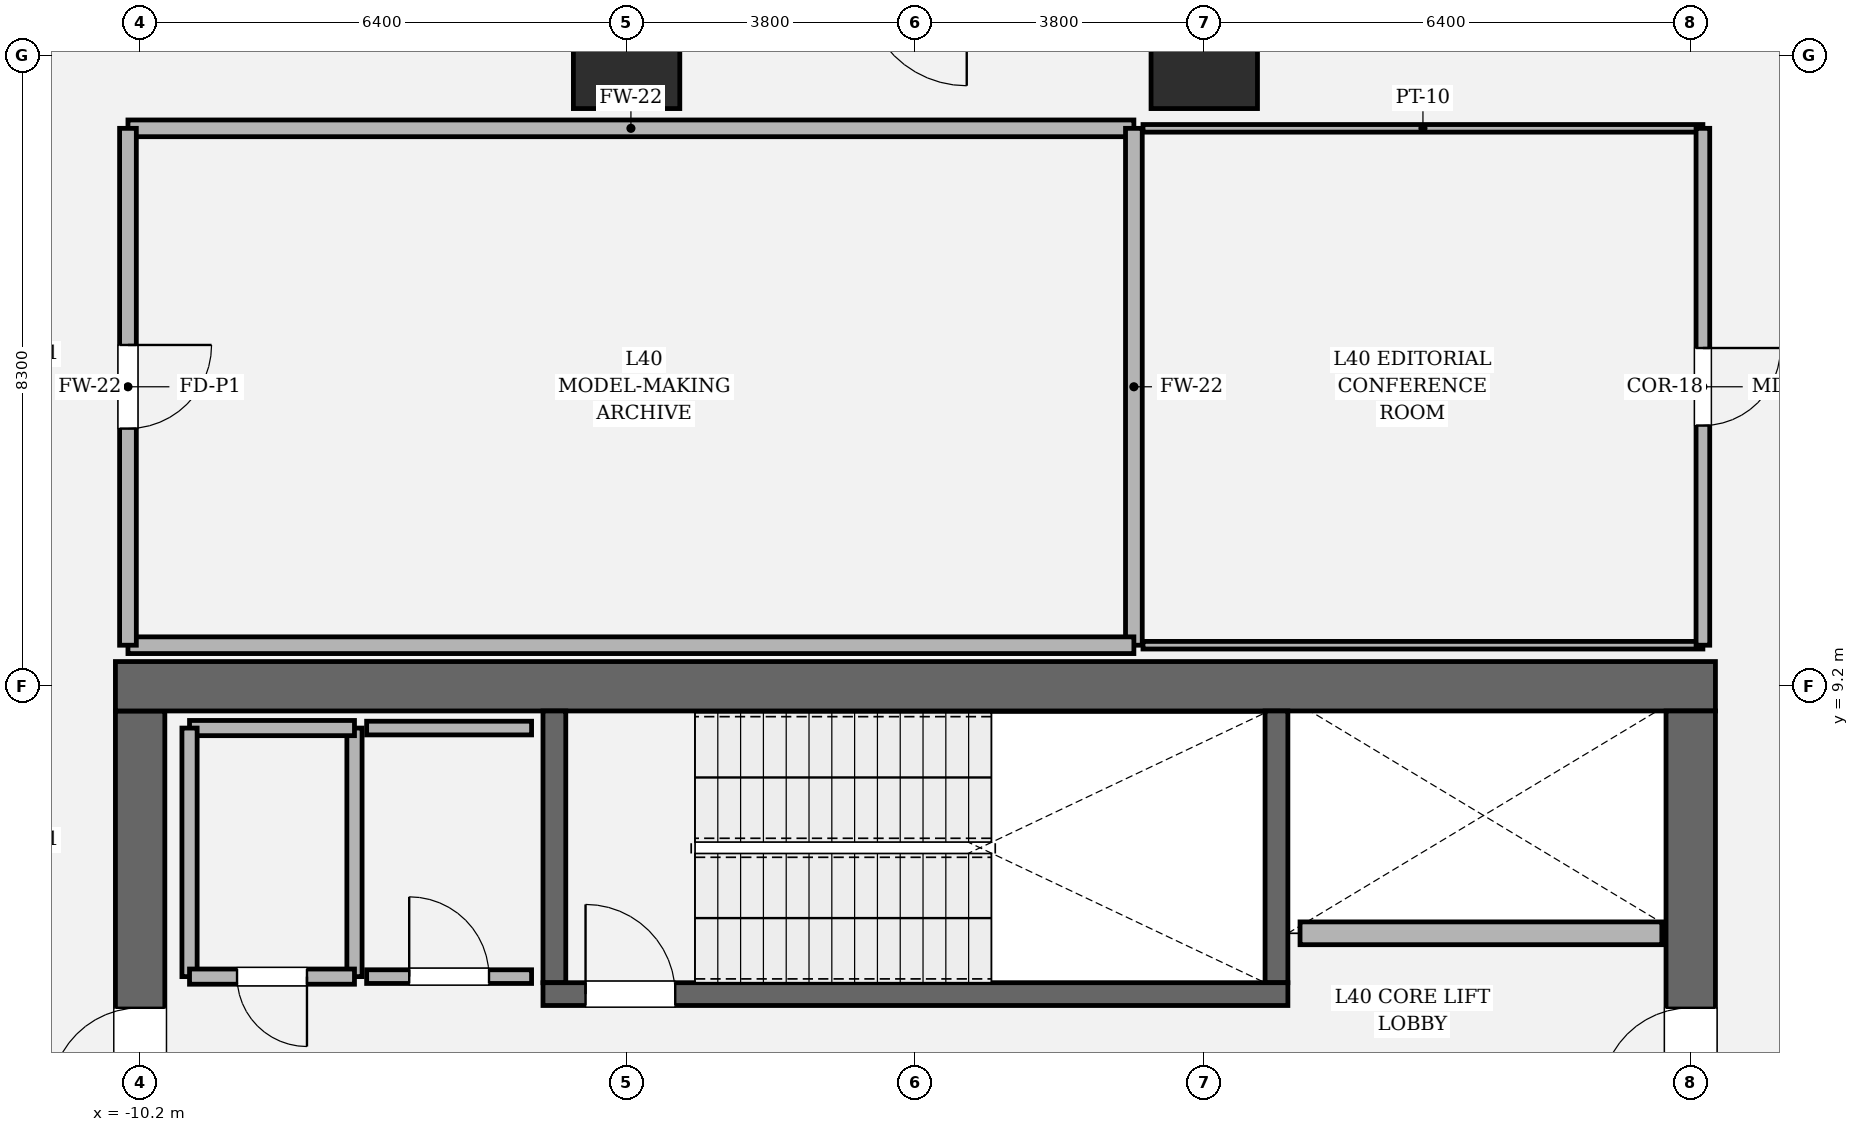
"""IFC4 building model, lengths in metres.
Left out: names, types, materials, properties, quantities, classifications, styles, units other than length and angle.
Written with IfcOpenShell. Run it as: python <this file> out.ifc"""

import sys

from ifc_helpers import new_model, si_unit, direction, frame, frame_2d, origin, origin_2d, place, context, subcontext, project, spatial, rectangle, hollow_rectangle, extrude, element, fill, save


model = new_model("IFC4")
c1 = context("Model", 3, precision=1e-05, world=origin(), true_north=direction((0.0, 1.0)))
c2 = subcontext(c1, "Body", "Model", "MODEL_VIEW")
j1 = project(units=[si_unit("LENGTHUNIT", "METRE"), si_unit("PLANEANGLEUNIT", "RADIAN")], contexts=[c1])
p1 = place(None, origin())
s1 = spatial("IfcSite", under=j1, at=p1, CompositionType="ELEMENT")
p2 = place(p1, origin())
s2 = spatial("IfcBuilding", under=s1, at=p2, CompositionType="ELEMENT")
p3 = place(p2, frame((0.0, 0.0, 172.2)))
s3 = spatial("IfcBuildingStorey", under=s2, at=p3, CompositionType="ELEMENT", Elevation=172.2)
p4 = place(p3, frame((-10.2, -8.875, 0.0), z_axis=(0.0, 0.0, 1.0), x_axis=(0.0, 1.0, 0.0)))
e1 = element("IfcWall", 1, at=p4, inside=s3, PredefinedType="SHEAR", context=c2, shape_type="SweptSolid", body=[
    extrude(rectangle(XDim=17.75, YDim=0.65, at=frame_2d((8.875, 0.0))), origin(), (0.0, 0.0, 1.0), 4.05),
])
p5 = place(p4, frame((12.665, 0.0, 0.0)))
e2 = element("IfcOpeningElement", 2, at=p5, cuts=e1, PredefinedType="OPENING", context=c2, shape_type="SweptSolid", body=[
    extrude(rectangle(XDim=1.18, YDim=2.2, at=frame_2d((0.59, 1.1))), frame((0.0, 0.335, 0.0), z_axis=(0.0, -1.0, 0.0), x_axis=(1.0, 0.0, 0.0)), (0.0, 0.0, 1.0), 0.67),
])
p6 = place(p3, frame((-10.525, 9.2, 0.0), z_axis=(0.0, 0.0, 1.0), x_axis=(1.0, 0.0, 0.0)))
e3 = element("IfcWall", 3, at=p6, inside=s3, PredefinedType="SHEAR", context=c2, shape_type="SweptSolid", body=[
    extrude(rectangle(XDim=21.05, YDim=0.65, at=frame_2d((10.525, 0.0))), origin(), (0.0, 0.0, 1.0), 4.05),
])
p7 = place(p3, frame((10.2, 8.875, 0.0), z_axis=(0.0, 0.0, 1.0), x_axis=(0.0, -1.0, 0.0)))
e4 = element("IfcWall", 4, at=p7, inside=s3, PredefinedType="SHEAR", context=c2, shape_type="SweptSolid", body=[
    extrude(rectangle(XDim=17.75, YDim=0.65, at=frame_2d((8.875, 0.0))), origin(), (0.0, 0.0, 1.0), 4.05),
])
p8 = place(p7, frame((3.905, 0.0, 0.0)))
e5 = element("IfcOpeningElement", 5, at=p8, cuts=e4, PredefinedType="OPENING", context=c2, shape_type="SweptSolid", body=[
    extrude(rectangle(XDim=1.18, YDim=2.2, at=frame_2d((0.59, 1.1))), frame((0.0, 0.335, 0.0), z_axis=(0.0, -1.0, 0.0), x_axis=(1.0, 0.0, 0.0)), (0.0, 0.0, 1.0), 0.67),
])
for number, where, z_axis, x_axis in (
    (6, (-4.75, 5.3, 0.0), (0.0, 0.0, 1.0), (0.0, 1.0, 0.0)),
    (7, (4.75, 8.875, 0.0), (0.0, 0.0, 1.0), (0.0, -1.0, 0.0)),
):
    element("IfcWall", number, at=place(p3, frame(where, z_axis=z_axis, x_axis=x_axis)), inside=s3, PredefinedType="SOLIDWALL", context=c2, shape_type="SweptSolid", body=[
        extrude(rectangle(XDim=3.575, YDim=0.3, at=frame_2d((1.788, 0.0))), origin(), (0.0, 0.0, 1.0), 4.05),
    ])
p9 = place(p3, frame((-4.9, 5.15, 0.0), z_axis=(0.0, 0.0, 1.0), x_axis=(1.0, 0.0, 0.0)))
e8 = element("IfcWall", 8, at=p9, inside=s3, PredefinedType="SOLIDWALL", context=c2, shape_type="SweptSolid", body=[
    extrude(rectangle(XDim=9.8, YDim=0.3, at=frame_2d((4.9, 0.0))), origin(), (0.0, 0.0, 1.0), 4.05),
])
p10 = place(p9, frame((0.56, 0.0, 0.0)))
e9 = element("IfcOpeningElement", 9, at=p10, cuts=e8, PredefinedType="OPENING", context=c2, shape_type="SweptSolid", body=[
    extrude(rectangle(XDim=1.18, YDim=2.2, at=frame_2d((0.59, 1.1))), frame((0.0, 0.16, 0.0), z_axis=(0.0, -1.0, 0.0), x_axis=(1.0, 0.0, 0.0)), (0.0, 0.0, 1.0), 0.32),
])
for number, where, z_axis, x_axis in (
    (10, (3.8, 17.5, 0.0), (0.0, 0.0, 1.0), (1.0, 0.0, 0.0)),
    (11, (-3.8, 17.5, 0.0), (0.0, 0.0, 1.0), (1.0, 0.0, 0.0)),
):
    element("IfcColumn", number, at=place(p3, frame(where, z_axis=z_axis, x_axis=x_axis)), inside=s3, PredefinedType="COLUMN", context=c2, shape_type="SweptSolid", body=[
        extrude(hollow_rectangle(XDim=1.4, YDim=1.4, WallThickness=0.042, at=origin_2d()), origin(), (0.0, 0.0, 1.0), 4.05),
    ])
p11 = place(p3, frame((5.06, 5.95, 0.0), z_axis=(0.0, 0.0, 1.0), x_axis=(1.0, 0.0, 0.0)))
e12 = element("IfcWall", 12, at=p11, inside=s3, PredefinedType="SOLIDWALL", context=c2, shape_type="SweptSolid", body=[
    extrude(rectangle(XDim=4.76, YDim=0.3, at=frame_2d((2.38, 0.0))), origin(), (0.0, 0.0, 1.0), 3.83),
])
p12 = place(p3, frame((-7.38, 5.38, 0.0), z_axis=(0.0, 0.0, 1.0), x_axis=(0.0, 1.0, 0.0)))
e13 = element("IfcWall", 13, at=p12, inside=s3, PredefinedType="SOLIDWALL", context=c2, shape_type="SweptSolid", body=[
    extrude(rectangle(XDim=3.27, YDim=0.2, at=frame_2d((1.635, 0.0))), origin(), (0.0, 0.0, 1.0), 3.83),
])
p13 = place(p3, frame((-7.38, 8.65, 0.0), z_axis=(0.0, 0.0, 1.0), x_axis=(-1.0, 0.0, 0.0)))
e14 = element("IfcWall", 14, at=p13, inside=s3, PredefinedType="SOLIDWALL", context=c2, shape_type="SweptSolid", body=[
    extrude(rectangle(XDim=2.17, YDim=0.2, at=frame_2d((1.085, 0.0))), origin(), (0.0, 0.0, 1.0), 3.83),
])
p14 = place(p3, frame((-9.55, 8.65, 0.0), z_axis=(0.0, 0.0, 1.0), x_axis=(0.0, -1.0, 0.0)))
e15 = element("IfcWall", 15, at=p14, inside=s3, PredefinedType="SOLIDWALL", context=c2, shape_type="SweptSolid", body=[
    extrude(rectangle(XDim=3.27, YDim=0.2, at=frame_2d((1.635, 0.0))), origin(), (0.0, 0.0, 1.0), 3.83),
])
p15 = place(p3, frame((-9.55, 5.38, 0.0), z_axis=(0.0, 0.0, 1.0), x_axis=(1.0, 0.0, 0.0)))
e16 = element("IfcWall", 16, at=p15, inside=s3, PredefinedType="SOLIDWALL", context=c2, shape_type="SweptSolid", body=[
    extrude(rectangle(XDim=2.17, YDim=0.2, at=frame_2d((1.085, 0.0))), origin(), (0.0, 0.0, 1.0), 3.83),
])
p16 = place(p15, frame((0.625, 0.0, 0.0)))
e17 = element("IfcOpeningElement", 17, at=p16, cuts=e16, PredefinedType="OPENING", context=c2, shape_type="SweptSolid", body=[
    extrude(rectangle(XDim=0.92, YDim=2.1, at=frame_2d((0.46, 1.05))), frame((0.0, 0.11, 0.0), z_axis=(0.0, -1.0, 0.0), x_axis=(1.0, 0.0, 0.0)), (0.0, 0.0, 1.0), 0.22),
])
p17 = place(p3, frame((-5.05, 8.65, 0.0), z_axis=(0.0, 0.0, 1.0), x_axis=(-1.0, 0.0, 0.0)))
e18 = element("IfcWall", 18, at=p17, inside=s3, PredefinedType="PARTITIONING", context=c2, shape_type="SweptSolid", body=[
    extrude(rectangle(XDim=2.17, YDim=0.18, at=frame_2d((1.085, 0.0))), origin(), (0.0, 0.0, 1.0), 3.83),
])
p18 = place(p3, frame((-7.22, 5.38, 0.0), z_axis=(0.0, 0.0, 1.0), x_axis=(1.0, 0.0, 0.0)))
e19 = element("IfcWall", 19, at=p18, inside=s3, PredefinedType="PARTITIONING", context=c2, shape_type="SweptSolid", body=[
    extrude(rectangle(XDim=2.17, YDim=0.18, at=frame_2d((1.085, 0.0))), origin(), (0.0, 0.0, 1.0), 3.83),
])
p19 = place(p18, frame((0.56, 0.0, 0.0)))
e20 = element("IfcOpeningElement", 20, at=p19, cuts=e19, PredefinedType="OPENING", context=c2, shape_type="SweptSolid", body=[
    extrude(rectangle(XDim=1.05, YDim=2.2, at=frame_2d((0.525, 1.1))), frame((0.0, 0.1, 0.0), z_axis=(0.0, -1.0, 0.0), x_axis=(1.0, 0.0, 0.0)), (0.0, 0.0, 1.0), 0.2),
])
p20 = place(p3, frame((-10.36, 16.54, 0.0), z_axis=(0.0, 0.0, 1.0), x_axis=(1.0, 0.0, 0.0)))
e21 = element("IfcWall", 21, at=p20, inside=s3, PredefinedType="SOLIDWALL", context=c2, shape_type="SweptSolid", body=[
    extrude(rectangle(XDim=13.234, YDim=0.22, at=frame_2d((6.617, 0.0))), origin(), (0.0, 0.0, 1.0), 3.174),
])
p21 = place(p3, frame((2.874, 16.54, 0.0), z_axis=(0.0, 0.0, 1.0), x_axis=(0.0, -1.0, 0.0)))
e22 = element("IfcWall", 22, at=p21, inside=s3, PredefinedType="SOLIDWALL", context=c2, shape_type="SweptSolid", body=[
    extrude(rectangle(XDim=6.8, YDim=0.22, at=frame_2d((3.4, 0.0))), origin(), (0.0, 0.0, 1.0), 3.83),
])
p22 = place(p3, frame((2.874, 9.74, 0.0), z_axis=(0.0, 0.0, 1.0), x_axis=(-1.0, 0.0, 0.0)))
e23 = element("IfcWall", 23, at=p22, inside=s3, PredefinedType="SOLIDWALL", context=c2, shape_type="SweptSolid", body=[
    extrude(rectangle(XDim=13.234, YDim=0.22, at=frame_2d((6.617, 0.0))), origin(), (0.0, 0.0, 1.0), 3.174),
])
p23 = place(p3, frame((-10.36, 9.74, 0.0), z_axis=(0.0, 0.0, 1.0), x_axis=(0.0, 1.0, 0.0)))
e24 = element("IfcWall", 24, at=p23, inside=s3, PredefinedType="SOLIDWALL", context=c2, shape_type="SweptSolid", body=[
    extrude(rectangle(XDim=6.8, YDim=0.22, at=frame_2d((3.4, 0.0))), origin(), (0.0, 0.0, 1.0), 3.174),
])
p24 = place(p23, frame((2.85, 0.0, 0.0)))
e25 = element("IfcOpeningElement", 25, at=p24, cuts=e24, PredefinedType="OPENING", context=c2, shape_type="SweptSolid", body=[
    extrude(rectangle(XDim=1.1, YDim=2.2, at=frame_2d((0.55, 1.1))), frame((0.0, 0.12, 0.0), z_axis=(0.0, -1.0, 0.0), x_axis=(1.0, 0.0, 0.0)), (0.0, 0.0, 1.0), 0.24),
])
for number, where, z_axis, x_axis in (
    (26, (10.36, 9.74, 0.0), (0.0, 0.0, 1.0), (-1.0, 0.0, 0.0)),
    (27, (2.994, 16.54, 0.0), (0.0, 0.0, 1.0), (1.0, 0.0, 0.0)),
):
    element("IfcWall", number, at=place(p3, frame(where, z_axis=z_axis, x_axis=x_axis)), inside=s3, PredefinedType="PARTITIONING", context=c2, shape_type="SweptSolid", body=[
        extrude(rectangle(XDim=7.366, YDim=0.1, at=frame_2d((3.683, 0.0))), origin(), (0.0, 0.0, 1.0), 3.174),
    ])
p25 = place(p3, frame((10.36, 16.54, 0.0), z_axis=(0.0, 0.0, 1.0), x_axis=(0.0, -1.0, 0.0)))
e28 = element("IfcWall", 28, at=p25, inside=s3, PredefinedType="PARTITIONING", context=c2, shape_type="SweptSolid", body=[
    extrude(rectangle(XDim=6.8, YDim=0.18, at=frame_2d((3.4, 0.0))), origin(), (0.0, 0.0, 1.0), 3.174),
])
p26 = place(p25, frame((2.89, 0.0, 0.0)))
e29 = element("IfcOpeningElement", 29, at=p26, cuts=e28, PredefinedType="OPENING", context=c2, shape_type="SweptSolid", body=[
    extrude(rectangle(XDim=1.02, YDim=2.2, at=frame_2d((0.51, 1.1))), frame((0.0, 0.1, 0.0), z_axis=(0.0, -1.0, 0.0), x_axis=(1.0, 0.0, 0.0)), (0.0, 0.0, 1.0), 0.2),
])
p27 = place(p10, origin())
e30 = element("IfcDoor", 30, at=p27, inside=s3, OperationType="SINGLE_SWING_LEFT", PredefinedType="DOOR", context=c2, shape_type="SweptSolid", body=[
    extrude(rectangle(XDim=1.18, YDim=2.2, at=frame_2d((0.59, 1.1))), frame((0.0, 0.025, 0.0), z_axis=(0.0, -1.0, 0.0), x_axis=(1.0, 0.0, 0.0)), (0.0, 0.0, 1.0), 0.05),
])
fill(e9, e30)
p28 = place(p5, origin())
e31 = element("IfcDoor", 31, at=p28, inside=s3, OperationType="SINGLE_SWING_LEFT", PredefinedType="DOOR", context=c2, shape_type="SweptSolid", body=[
    extrude(rectangle(XDim=1.18, YDim=2.2, at=frame_2d((0.59, 1.1))), frame((0.0, 0.025, 0.0), z_axis=(0.0, -1.0, 0.0), x_axis=(1.0, 0.0, 0.0)), (0.0, 0.0, 1.0), 0.05),
])
fill(e2, e31)
p29 = place(p8, origin())
e32 = element("IfcDoor", 32, at=p29, inside=s3, OperationType="SINGLE_SWING_RIGHT", PredefinedType="DOOR", context=c2, shape_type="SweptSolid", body=[
    extrude(rectangle(XDim=1.18, YDim=2.2, at=frame_2d((0.59, 1.1))), frame((0.0, 0.025, 0.0), z_axis=(0.0, -1.0, 0.0), x_axis=(1.0, 0.0, 0.0)), (0.0, 0.0, 1.0), 0.05),
])
fill(e5, e32)
p30 = place(p16, origin())
e33 = element("IfcDoor", 33, at=p30, inside=s3, OperationType="SINGLE_SWING_RIGHT", PredefinedType="DOOR", context=c2, shape_type="SweptSolid", body=[
    extrude(rectangle(XDim=0.92, YDim=2.1, at=frame_2d((0.46, 1.05))), frame((0.0, 0.025, 0.0), z_axis=(0.0, -1.0, 0.0), x_axis=(1.0, 0.0, 0.0)), (0.0, 0.0, 1.0), 0.05),
])
fill(e17, e33)
p31 = place(p19, origin())
e34 = element("IfcDoor", 34, at=p31, inside=s3, OperationType="SINGLE_SWING_LEFT", PredefinedType="DOOR", context=c2, shape_type="SweptSolid", body=[
    extrude(rectangle(XDim=1.05, YDim=2.2, at=frame_2d((0.525, 1.1))), frame((0.0, 0.025, 0.0), z_axis=(0.0, -1.0, 0.0), x_axis=(1.0, 0.0, 0.0)), (0.0, 0.0, 1.0), 0.05),
])
fill(e20, e34)
p32 = place(p24, origin())
e35 = element("IfcDoor", 35, at=p32, inside=s3, OperationType="SINGLE_SWING_RIGHT", PredefinedType="DOOR", context=c2, shape_type="SweptSolid", body=[
    extrude(rectangle(XDim=1.1, YDim=2.2, at=frame_2d((0.55, 1.1))), frame((0.0, 0.025, 0.0), z_axis=(0.0, -1.0, 0.0), x_axis=(1.0, 0.0, 0.0)), (0.0, 0.0, 1.0), 0.05),
])
fill(e25, e35)
p33 = place(p26, origin())
e36 = element("IfcDoor", 36, at=p33, inside=s3, OperationType="SINGLE_SWING_LEFT", PredefinedType="DOOR", context=c2, shape_type="SweptSolid", body=[
    extrude(rectangle(XDim=1.02, YDim=2.2, at=frame_2d((0.51, 1.1))), frame((0.0, 0.025, 0.0), z_axis=(0.0, -1.0, 0.0), x_axis=(1.0, 0.0, 0.0)), (0.0, 0.0, 1.0), 0.05),
])
fill(e29, e36)
save(model, sys.argv[1])
